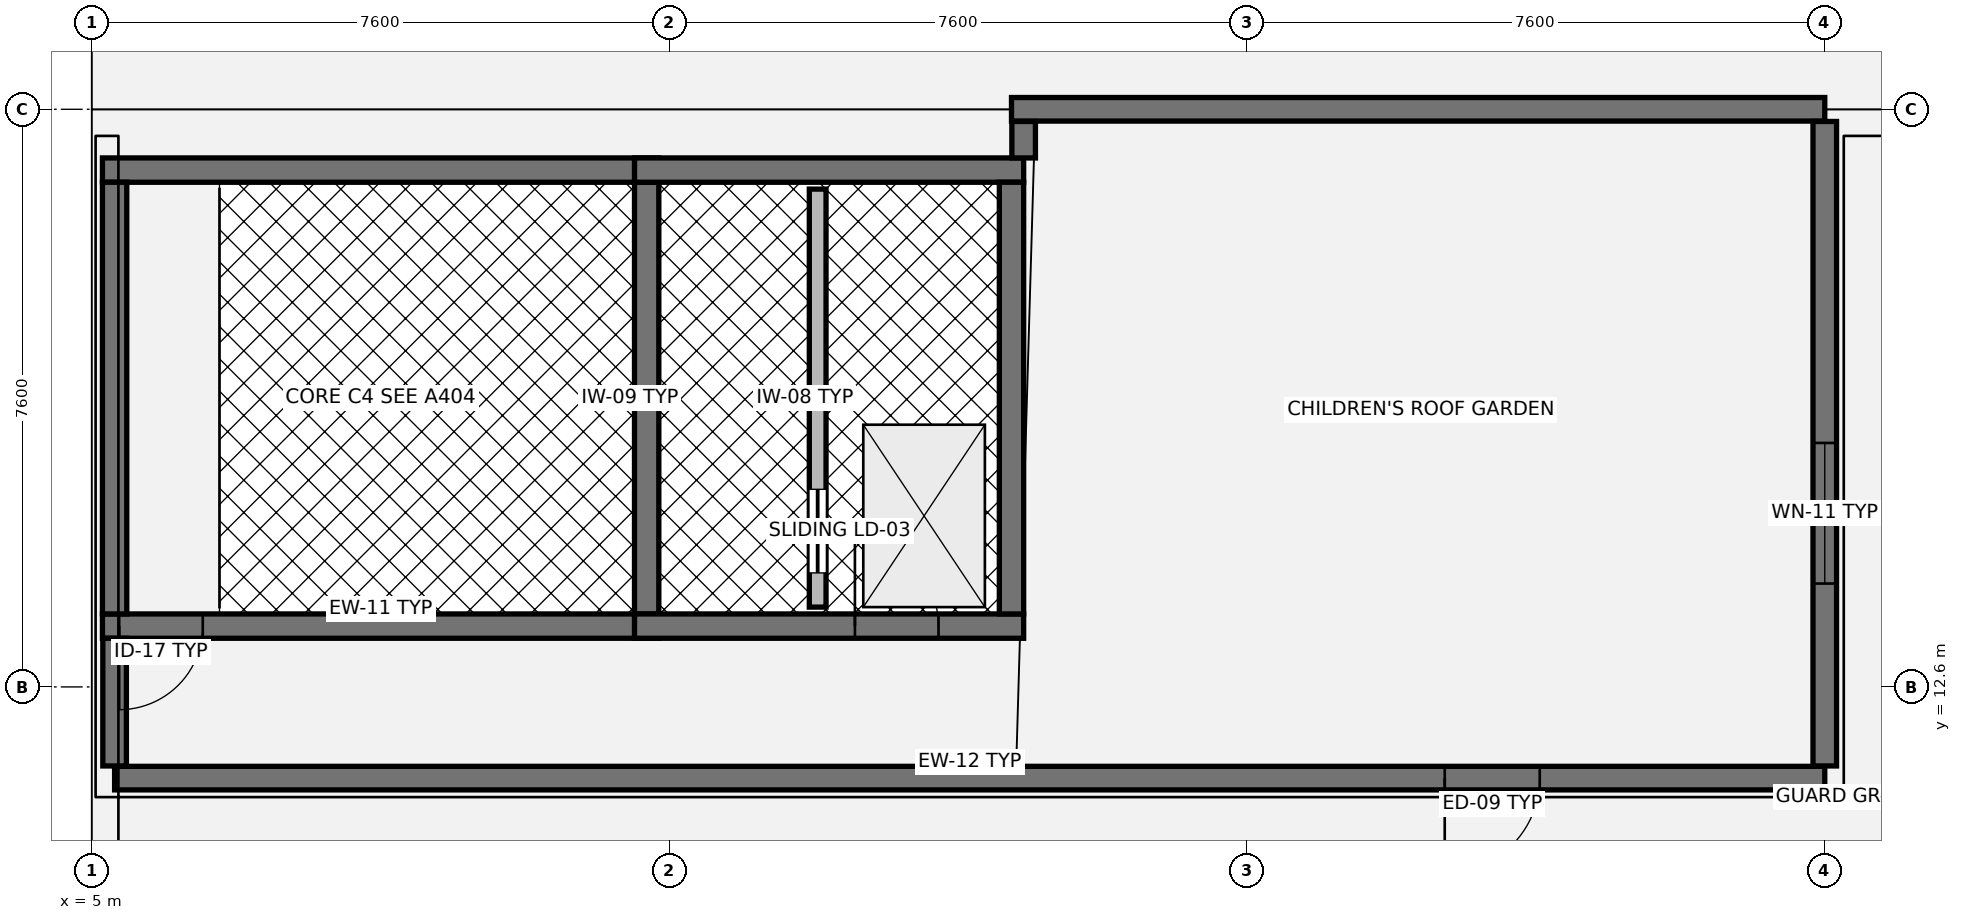
"""IFC4 building model, lengths in metres.
Left out: names, types, materials, properties, quantities, classifications, styles, units other than length and angle.
Written with IfcOpenShell. Run it as: python <this file> out.ifc"""

import sys

from ifc_helpers import new_model, si_unit, direction, frame, frame_2d, origin, place, context, subcontext, project, spatial, rectangle, extrude, element, fill, save


model = new_model("IFC4")
c1 = context("Model", 3, precision=1e-05, world=origin(), true_north=direction((0.0, 1.0)))
c2 = subcontext(c1, "Body", "Model", "MODEL_VIEW")
j1 = project(units=[si_unit("LENGTHUNIT", "METRE"), si_unit("PLANEANGLEUNIT", "RADIAN")], contexts=[c1])
p1 = place(None, origin())
s1 = spatial("IfcSite", under=j1, at=p1, CompositionType="ELEMENT")
p2 = place(p1, origin())
s2 = spatial("IfcBuilding", under=s1, at=p2, CompositionType="ELEMENT")
p3 = place(p2, frame((0.0, 0.0, 13.26)))
s3 = spatial("IfcBuildingStorey", under=s2, at=p3, CompositionType="ELEMENT", Elevation=13.26)
p4 = place(p3, frame((5.14, 13.4, 0.0), z_axis=(0.0, 0.0, 1.0), x_axis=(1.0, 0.0, 0.0)))
e1 = element("IfcWall", 1, at=p4, inside=s3, PredefinedType="SOLIDWALL", context=c2, shape_type="SweptSolid", body=[
    extrude(rectangle(XDim=7.32, YDim=0.32, at=frame_2d((3.66, 0.0))), origin(), (0.0, 0.0, 1.0), 4.0),
])
p5 = place(p4, frame((0.22, 0.0, 0.0)))
e2 = element("IfcOpeningElement", 2, at=p5, cuts=e1, PredefinedType="OPENING", context=c2, shape_type="SweptSolid", body=[
    extrude(rectangle(XDim=1.1, YDim=2.18, at=frame_2d((0.55, 1.09))), frame((0.0, 0.17, 0.0), z_axis=(0.0, -1.0, 0.0), x_axis=(1.0, 0.0, 0.0)), (0.0, 0.0, 1.0), 0.34),
])
p6 = place(p3, frame((12.46, 19.4, 0.0), z_axis=(0.0, 0.0, 1.0), x_axis=(-1.0, 0.0, 0.0)))
e3 = element("IfcWall", 3, at=p6, inside=s3, PredefinedType="SOLIDWALL", context=c2, shape_type="SweptSolid", body=[
    extrude(rectangle(XDim=7.32, YDim=0.32, at=frame_2d((3.66, 0.0))), origin(), (0.0, 0.0, 1.0), 4.0),
])
for number, where, z_axis, x_axis in (
    (4, (12.3, 13.56, 0.0), (0.0, 0.0, 1.0), (0.0, 1.0, 0.0)),
    (5, (5.3, 19.24, 0.0), (0.0, 0.0, 1.0), (0.0, -1.0, 0.0)),
):
    element("IfcWall", number, at=place(p3, frame(where, z_axis=z_axis, x_axis=x_axis)), inside=s3, PredefinedType="SOLIDWALL", context=c2, shape_type="SweptSolid", body=[
        extrude(rectangle(XDim=5.68, YDim=0.32, at=frame_2d((2.84, 0.0))), origin(), (0.0, 0.0, 1.0), 4.0),
    ])
p7 = place(p3, frame((12.14, 13.4, 0.0), z_axis=(0.0, 0.0, 1.0), x_axis=(1.0, 0.0, 0.0)))
e6 = element("IfcWall", 6, at=p7, inside=s3, PredefinedType="SOLIDWALL", context=c2, shape_type="SweptSolid", body=[
    extrude(rectangle(XDim=5.12, YDim=0.32, at=frame_2d((2.56, 0.0))), origin(), (0.0, 0.0, 1.0), 4.0),
])
p8 = place(p7, frame((2.9, 0.0, 0.0)))
e7 = element("IfcOpeningElement", 7, at=p8, cuts=e6, PredefinedType="OPENING", context=c2, shape_type="SweptSolid", body=[
    extrude(rectangle(XDim=1.1, YDim=2.18, at=frame_2d((0.55, 1.09))), frame((0.0, 0.17, 0.0), z_axis=(0.0, -1.0, 0.0), x_axis=(1.0, 0.0, 0.0)), (0.0, 0.0, 1.0), 0.34),
])
p9 = place(p3, frame((17.26, 19.4, 0.0), z_axis=(0.0, 0.0, 1.0), x_axis=(-1.0, 0.0, 0.0)))
e8 = element("IfcWall", 8, at=p9, inside=s3, PredefinedType="SOLIDWALL", context=c2, shape_type="SweptSolid", body=[
    extrude(rectangle(XDim=5.12, YDim=0.32, at=frame_2d((2.56, 0.0))), origin(), (0.0, 0.0, 1.0), 4.0),
])
p10 = place(p3, frame((17.1, 13.56, 0.0), z_axis=(0.0, 0.0, 1.0), x_axis=(0.0, 1.0, 0.0)))
e9 = element("IfcWall", 9, at=p10, inside=s3, PredefinedType="SOLIDWALL", context=c2, shape_type="SweptSolid", body=[
    extrude(rectangle(XDim=5.68, YDim=0.32, at=frame_2d((2.84, 0.0))), origin(), (0.0, 0.0, 1.0), 4.0),
])
p11 = place(p3, frame((14.55, 13.65, 0.0), z_axis=(0.0, 0.0, 1.0), x_axis=(0.0, 1.0, 0.0)))
e10 = element("IfcWall", 10, at=p11, inside=s3, PredefinedType="SOLIDWALL", context=c2, shape_type="SweptSolid", body=[
    extrude(rectangle(XDim=5.5, YDim=0.22, at=frame_2d((2.75, 0.0))), origin(), (0.0, 0.0, 1.0), 2.7),
])
p12 = place(p11, frame((0.45, 0.0, 0.0)))
e11 = element("IfcOpeningElement", 11, at=p12, cuts=e10, PredefinedType="OPENING", context=c2, shape_type="SweptSolid", body=[
    extrude(rectangle(XDim=1.1, YDim=2.15, at=frame_2d((0.55, 1.075))), frame((0.0, 0.12, 0.0), z_axis=(0.0, -1.0, 0.0), x_axis=(1.0, 0.0, 0.0)), (0.0, 0.0, 1.0), 0.24),
])
p13 = place(p3, frame((5.3, 11.4, 0.0), z_axis=(0.0, 0.0, 1.0), x_axis=(1.0, 0.0, 0.0)))
e12 = element("IfcWall", 12, at=p13, inside=s3, PredefinedType="SOLIDWALL", context=c2, shape_type="SweptSolid", body=[
    extrude(rectangle(XDim=22.5, YDim=0.31, at=frame_2d((11.25, 0.0))), origin(), (0.0, 0.0, 1.0), 4.0),
])
p14 = place(p13, frame((17.5, 0.0, 0.0)))
e13 = element("IfcOpeningElement", 13, at=p14, cuts=e12, PredefinedType="OPENING", context=c2, shape_type="SweptSolid", body=[
    extrude(rectangle(XDim=1.25, YDim=2.2, at=frame_2d((0.625, 1.1))), frame((0.0, 0.165, 0.0), z_axis=(0.0, -1.0, 0.0), x_axis=(1.0, 0.0, 0.0)), (0.0, 0.0, 1.0), 0.33),
])
p15 = place(p3, frame((5.3, 11.56, 0.0), z_axis=(0.0, 0.0, 1.0), x_axis=(0.0, 1.0, 0.0)))
e14 = element("IfcWall", 14, at=p15, inside=s3, PredefinedType="SOLIDWALL", context=c2, shape_type="SweptSolid", body=[
    extrude(rectangle(XDim=1.68, YDim=0.31, at=frame_2d((0.84, 0.0))), origin(), (0.0, 0.0, 1.0), 4.0),
])
p16 = place(p3, frame((27.8, 20.2, 0.0), z_axis=(0.0, 0.0, 1.0), x_axis=(-1.0, 0.0, 0.0)))
e15 = element("IfcWall", 15, at=p16, inside=s3, PredefinedType="SOLIDWALL", context=c2, shape_type="SweptSolid", body=[
    extrude(rectangle(XDim=10.7, YDim=0.31, at=frame_2d((5.35, 0.0))), origin(), (0.0, 0.0, 1.0), 4.0),
])
p17 = place(p3, frame((27.8, 11.56, 0.0), z_axis=(0.0, 0.0, 1.0), x_axis=(0.0, 1.0, 0.0)))
e16 = element("IfcWall", 16, at=p17, inside=s3, PredefinedType="SOLIDWALL", context=c2, shape_type="SweptSolid", body=[
    extrude(rectangle(XDim=8.48, YDim=0.31, at=frame_2d((4.24, 0.0))), origin(), (0.0, 0.0, 1.0), 4.0),
])
p18 = place(p17, frame((2.4, 0.0, 0.8)))
e17 = element("IfcOpeningElement", 17, at=p18, cuts=e16, PredefinedType="OPENING", context=c2, shape_type="SweptSolid", body=[
    extrude(rectangle(XDim=1.85, YDim=2.1, at=frame_2d((0.925, 1.05))), frame((0.0, 0.165, 0.0), z_axis=(0.0, -1.0, 0.0), x_axis=(1.0, 0.0, 0.0)), (0.0, 0.0, 1.0), 0.33),
])
p19 = place(p3, frame((17.26, 19.56, 0.0), z_axis=(0.0, 0.0, 1.0), x_axis=(0.0, 1.0, 0.0)))
e18 = element("IfcWall", 18, at=p19, inside=s3, PredefinedType="SOLIDWALL", context=c2, shape_type="SweptSolid", body=[
    extrude(rectangle(XDim=0.48, YDim=0.31, at=frame_2d((0.24, 0.0))), origin(), (0.0, 0.0, 1.0), 4.0),
])
p20 = place(p5, origin())
e19 = element("IfcDoor", 19, at=p20, inside=s3, OperationType="SINGLE_SWING_RIGHT", PredefinedType="DOOR", context=c2, shape_type="SweptSolid", body=[
    extrude(rectangle(XDim=1.1, YDim=2.18, at=frame_2d((0.55, 1.09))), frame((0.0, 0.025, 0.0), z_axis=(0.0, -1.0, 0.0), x_axis=(1.0, 0.0, 0.0)), (0.0, 0.0, 1.0), 0.05),
])
fill(e2, e19)
p21 = place(p8, origin())
e20 = element("IfcDoor", 20, at=p21, inside=s3, OperationType="SINGLE_SWING_LEFT", PredefinedType="DOOR", context=c2, shape_type="SweptSolid", body=[
    extrude(rectangle(XDim=1.1, YDim=2.18, at=frame_2d((0.55, 1.09))), frame((0.0, 0.025, 0.0), z_axis=(0.0, -1.0, 0.0), x_axis=(1.0, 0.0, 0.0)), (0.0, 0.0, 1.0), 0.05),
])
fill(e7, e20)
p22 = place(p12, origin())
e21 = element("IfcDoor", 21, at=p22, inside=s3, OperationType="SLIDING_TO_LEFT", PredefinedType="DOOR", context=c2, shape_type="SweptSolid", body=[
    extrude(rectangle(XDim=1.1, YDim=2.15, at=frame_2d((0.55, 1.075))), frame((0.0, 0.025, 0.0), z_axis=(0.0, -1.0, 0.0), x_axis=(1.0, 0.0, 0.0)), (0.0, 0.0, 1.0), 0.05),
])
fill(e11, e21)
p23 = place(p14, origin())
e22 = element("IfcDoor", 22, at=p23, inside=s3, OperationType="SINGLE_SWING_RIGHT", PredefinedType="DOOR", context=c2, shape_type="SweptSolid", body=[
    extrude(rectangle(XDim=1.25, YDim=2.2, at=frame_2d((0.625, 1.1))), frame((0.0, 0.025, 0.0), z_axis=(0.0, -1.0, 0.0), x_axis=(1.0, 0.0, 0.0)), (0.0, 0.0, 1.0), 0.05),
])
fill(e13, e22)
p24 = place(p18, origin())
e23 = element("IfcWindow", 23, at=p24, inside=s3, PartitioningType="SINGLE_PANEL", PredefinedType="WINDOW", context=c2, shape_type="SweptSolid", body=[
    extrude(rectangle(XDim=1.85, YDim=2.1, at=frame_2d((0.925, 1.05))), frame((0.0, 0.03, 0.0), z_axis=(0.0, -1.0, 0.0), x_axis=(1.0, 0.0, 0.0)), (0.0, 0.0, 1.0), 0.06),
])
fill(e17, e23)
save(model, sys.argv[1])
